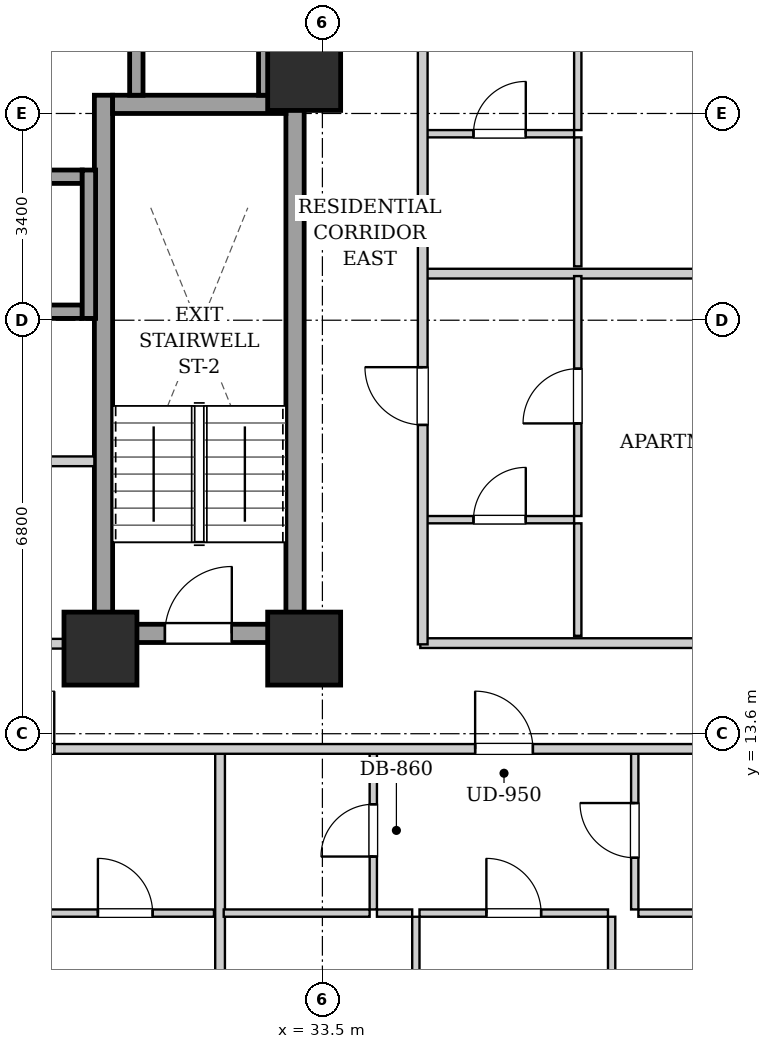
"""IFC4 building model, lengths in metres.
Left out: names, types, materials, properties, quantities, classifications, styles, units other than length and angle.
Written with IfcOpenShell. Run it as: python <this file> out.ifc"""

import sys

from ifc_helpers import new_model, si_unit, direction, frame, frame_2d, origin, origin_2d, place, context, subcontext, project, spatial, rectangle, extrude, element, fill, save


model = new_model("IFC4")
c1 = context("Model", 3, precision=1e-05, world=origin(), true_north=direction((0.0, 1.0)))
c2 = subcontext(c1, "Body", "Model", "MODEL_VIEW")
j1 = project(units=[si_unit("LENGTHUNIT", "METRE"), si_unit("PLANEANGLEUNIT", "RADIAN")], contexts=[c1])
p1 = place(None, origin())
s1 = spatial("IfcSite", under=j1, at=p1, CompositionType="ELEMENT")
p2 = place(p1, origin())
s2 = spatial("IfcBuilding", under=s1, at=p2, CompositionType="ELEMENT")
p3 = place(p2, frame((0.0, 0.0, 54.6)))
s3 = spatial("IfcBuildingStorey", under=s2, at=p3, CompositionType="ELEMENT", Elevation=54.6)
for number, where, z_axis, x_axis in (
    (1, (29.85, 15.0, 0.0), (0.0, 0.0, 1.0), (1.0, 0.0, 0.0)),
    (2, (33.2, 15.0, 0.0), (0.0, 0.0, 1.0), (1.0, 0.0, 0.0)),
    (3, (33.2, 24.45, 0.0), (0.0, 0.0, 1.0), (1.0, 0.0, 0.0)),
):
    element("IfcColumn", number, at=place(p3, frame(where, z_axis=z_axis, x_axis=x_axis)), inside=s3, PredefinedType="COLUMN", context=c2, shape_type="SweptSolid", body=[
        extrude(rectangle(XDim=1.2, YDim=1.2, at=origin_2d()), origin(), (0.0, 0.0, 1.0), 3.2),
    ])
for number, where, z_axis, x_axis in (
    (4, (29.9, 15.1, 0.0), (0.0, 0.0, 1.0), (0.0, 1.0, 0.0)),
    (5, (33.05, 15.1, 0.0), (0.0, 0.0, 1.0), (0.0, 1.0, 0.0)),
):
    element("IfcWall", number, at=place(p3, frame(where, z_axis=z_axis, x_axis=x_axis)), inside=s3, PredefinedType="SHEAR", context=c2, shape_type="SweptSolid", body=[
        extrude(rectangle(XDim=9.0, YDim=0.3, at=frame_2d((4.5, 0.0))), origin(), (0.0, 0.0, 1.0), 2.94),
    ])
p4 = place(p3, frame((30.05, 23.95, 0.0), z_axis=(0.0, 0.0, 1.0), x_axis=(1.0, 0.0, 0.0)))
e6 = element("IfcWall", 6, at=p4, inside=s3, PredefinedType="SHEAR", context=c2, shape_type="SweptSolid", body=[
    extrude(rectangle(XDim=2.85, YDim=0.3, at=frame_2d((1.425, 0.0))), origin(), (0.0, 0.0, 1.0), 2.94),
])
p5 = place(p3, frame((30.05, 15.25, 0.0), z_axis=(0.0, 0.0, 1.0), x_axis=(1.0, 0.0, 0.0)))
e7 = element("IfcWall", 7, at=p5, inside=s3, PredefinedType="SHEAR", context=c2, shape_type="SweptSolid", body=[
    extrude(rectangle(XDim=2.85, YDim=0.3, at=frame_2d((1.425, 0.0))), origin(), (0.0, 0.0, 1.0), 2.94),
])
p6 = place(p5, frame((0.86, 0.0, 0.0)))
e8 = element("IfcOpeningElement", 8, at=p6, cuts=e7, PredefinedType="OPENING", context=c2, shape_type="SweptSolid", body=[
    extrude(rectangle(XDim=1.1, YDim=2.05, at=frame_2d((0.55, 1.025))), frame((0.0, 0.16, 0.0), z_axis=(0.0, -1.0, 0.0), x_axis=(1.0, 0.0, 0.0)), (0.0, 0.0, 1.0), 0.32),
])
for number, where, z_axis, x_axis in (
    (9, (27.65, 20.54, 0.0), (0.0, 0.0, 1.0), (1.0, 0.0, 0.0)),
    (10, (27.65, 22.76, 0.0), (0.0, 0.0, 1.0), (1.0, 0.0, 0.0)),
):
    element("IfcWall", number, at=place(p3, frame(where, z_axis=z_axis, x_axis=x_axis)), inside=s3, PredefinedType="SHEAR", context=c2, shape_type="SweptSolid", body=[
        extrude(rectangle(XDim=1.9, YDim=0.22, at=frame_2d((0.95, 0.0))), origin(), (0.0, 0.0, 1.0), 2.94),
    ])
p7 = place(p3, frame((29.66, 20.43, 0.0), z_axis=(0.0, 0.0, 1.0), x_axis=(0.0, 1.0, 0.0)))
e11 = element("IfcWall", 11, at=p7, inside=s3, PredefinedType="SHEAR", context=c2, shape_type="SweptSolid", body=[
    extrude(rectangle(XDim=2.44, YDim=0.22, at=frame_2d((1.22, 0.0))), origin(), (0.0, 0.0, 1.0), 2.94),
])
for number, where, z_axis, x_axis in (
    (12, (30.44, 24.1, 0.0), (0.0, 0.0, 1.0), (0.0, 1.0, 0.0)),
    (13, (32.56, 24.1, 0.0), (0.0, 0.0, 1.0), (0.0, 1.0, 0.0)),
):
    element("IfcWall", number, at=place(p3, frame(where, z_axis=z_axis, x_axis=x_axis)), inside=s3, PredefinedType="SHEAR", context=c2, shape_type="SweptSolid", body=[
        extrude(rectangle(XDim=2.07, YDim=0.22, at=frame_2d((1.035, 0.0))), origin(), (0.0, 0.0, 1.0), 2.94),
    ])
p8 = place(p3, frame((21.25, 15.08, 0.0), z_axis=(0.0, 0.0, 1.0), x_axis=(1.0, 0.0, 0.0)))
e14 = element("IfcWall", 14, at=p8, inside=s3, PredefinedType="PARTITIONING", context=c2, shape_type="SweptSolid", body=[
    extrude(rectangle(XDim=8.5, YDim=0.16, at=frame_2d((4.25, 0.0))), origin(), (0.0, 0.0, 1.0), 2.232),
])
p9 = place(p8, frame((3.725, 0.0, 0.0)))
e15 = element("IfcOpeningElement", 15, at=p9, cuts=e14, PredefinedType="OPENING", context=c2, shape_type="SweptSolid", body=[
    extrude(rectangle(XDim=1.05, YDim=2.05, at=frame_2d((0.525, 1.025))), frame((0.0, 0.09, 0.0), z_axis=(0.0, -1.0, 0.0), x_axis=(1.0, 0.0, 0.0)), (0.0, 0.0, 1.0), 0.18),
])
p10 = place(p3, frame((28.65, 18.08, 0.0), z_axis=(0.0, 0.0, 1.0), x_axis=(1.0, 0.0, 0.0)))
e16 = element("IfcWall", 16, at=p10, inside=s3, PredefinedType="PARTITIONING", context=c2, shape_type="SweptSolid", body=[
    extrude(rectangle(XDim=1.1, YDim=0.16, at=frame_2d((0.55, 0.0))), origin(), (0.0, 0.0, 1.0), 2.94),
])
p11 = place(p3, frame((33.12, 24.12, 0.0), z_axis=(0.0, 0.0, 1.0), x_axis=(0.0, 1.0, 0.0)))
e17 = element("IfcWall", 17, at=p11, inside=s3, PredefinedType="PARTITIONING", context=c2, shape_type="SweptSolid", body=[
    extrude(rectangle(XDim=4.76, YDim=0.16, at=frame_2d((2.38, 0.0))), origin(), (0.0, 0.0, 1.0), 2.94),
])
p12 = place(p3, frame((35.11, 15.09, 0.0), z_axis=(0.0, 0.0, 1.0), x_axis=(1.0, 0.0, 0.0)))
e18 = element("IfcWall", 18, at=p12, inside=s3, PredefinedType="PARTITIONING", context=c2, shape_type="SweptSolid", body=[
    extrude(rectangle(XDim=11.11, YDim=0.16, at=frame_2d((5.555, 0.0))), origin(), (0.0, 0.0, 1.0), 2.232),
])
p13 = place(p3, frame((28.799, 10.65, 0.0), z_axis=(0.0, 0.0, 1.0), x_axis=(1.0, 0.0, 0.0)))
e19 = element("IfcWall", 19, at=p13, inside=s3, PredefinedType="PARTITIONING", context=c2, shape_type="SweptSolid", body=[
    extrude(rectangle(XDim=2.918, YDim=0.12, at=frame_2d((1.459, 0.0))), origin(), (0.0, 0.0, 1.0), 2.94),
])
p14 = place(p13, frame((1.009, 0.0, 0.0)))
e20 = element("IfcOpeningElement", 20, at=p14, cuts=e19, PredefinedType="OPENING", context=c2, shape_type="SweptSolid", body=[
    extrude(rectangle(XDim=0.9, YDim=2.05, at=frame_2d((0.45, 1.025))), frame((0.0, 0.07, 0.0), z_axis=(0.0, -1.0, 0.0), x_axis=(1.0, 0.0, 0.0)), (0.0, 0.0, 1.0), 0.14),
])
p15 = place(p3, frame((31.817, 0.28, 0.0), z_axis=(0.0, 0.0, 1.0), x_axis=(0.0, 1.0, 0.0)))
e21 = element("IfcWall", 21, at=p15, inside=s3, PredefinedType="PARTITIONING", context=c2, shape_type="SweptSolid", body=[
    extrude(rectangle(XDim=13.03, YDim=0.16, at=frame_2d((6.515, 0.0))), origin(), (0.0, 0.0, 1.0), 2.94),
])
p16 = place(p3, frame((34.337, 10.71, 0.0), z_axis=(0.0, 0.0, 1.0), x_axis=(0.0, 1.0, 0.0)))
e22 = element("IfcWall", 22, at=p16, inside=s3, PredefinedType="PARTITIONING", context=c2, shape_type="SweptSolid", body=[
    extrude(rectangle(XDim=2.6, YDim=0.12, at=frame_2d((1.3, 0.0))), origin(), (0.0, 0.0, 1.0), 2.94),
])
p17 = place(p16, frame((0.87, 0.0, 0.0)))
e23 = element("IfcOpeningElement", 23, at=p17, cuts=e22, PredefinedType="OPENING", context=c2, shape_type="SweptSolid", body=[
    extrude(rectangle(XDim=0.86, YDim=2.05, at=frame_2d((0.43, 1.025))), frame((0.0, 0.07, 0.0), z_axis=(0.0, -1.0, 0.0), x_axis=(1.0, 0.0, 0.0)), (0.0, 0.0, 1.0), 0.14),
])
p18 = place(p3, frame((31.877, 10.65, 0.0), z_axis=(0.0, 0.0, 1.0), x_axis=(1.0, 0.0, 0.0)))
e24 = element("IfcWall", 24, at=p18, inside=s3, PredefinedType="PARTITIONING", context=c2, shape_type="SweptSolid", body=[
    extrude(rectangle(XDim=2.4, YDim=0.12, at=frame_2d((1.2, 0.0))), origin(), (0.0, 0.0, 1.0), 2.94),
])
p19 = place(p3, frame((38.637, 10.71, 0.0), z_axis=(0.0, 0.0, 1.0), x_axis=(0.0, 1.0, 0.0)))
e25 = element("IfcWall", 25, at=p19, inside=s3, PredefinedType="PARTITIONING", context=c2, shape_type="SweptSolid", body=[
    extrude(rectangle(XDim=2.6, YDim=0.12, at=frame_2d((1.3, 0.0))), origin(), (0.0, 0.0, 1.0), 2.94),
])
p20 = place(p19, frame((0.85, 0.0, 0.0)))
e26 = element("IfcOpeningElement", 26, at=p20, cuts=e25, PredefinedType="OPENING", context=c2, shape_type="SweptSolid", body=[
    extrude(rectangle(XDim=0.9, YDim=2.05, at=frame_2d((0.45, 1.025))), frame((0.0, 0.07, 0.0), z_axis=(0.0, -1.0, 0.0), x_axis=(1.0, 0.0, 0.0)), (0.0, 0.0, 1.0), 0.14),
])
p21 = place(p3, frame((34.397, 10.65, 0.0), z_axis=(0.0, 0.0, 1.0), x_axis=(1.0, 0.0, 0.0)))
e27 = element("IfcWall", 27, at=p21, inside=s3, PredefinedType="PARTITIONING", context=c2, shape_type="SweptSolid", body=[
    extrude(rectangle(XDim=0.58, YDim=0.12, at=frame_2d((0.29, 0.0))), origin(), (0.0, 0.0, 1.0), 2.94),
])
p22 = place(p3, frame((35.097, 10.65, 0.0), z_axis=(0.0, 0.0, 1.0), x_axis=(1.0, 0.0, 0.0)))
e28 = element("IfcWall", 28, at=p22, inside=s3, PredefinedType="PARTITIONING", context=c2, shape_type="SweptSolid", body=[
    extrude(rectangle(XDim=3.1, YDim=0.12, at=frame_2d((1.55, 0.0))), origin(), (0.0, 0.0, 1.0), 2.94),
])
p23 = place(p22, frame((1.1, 0.0, 0.0)))
e29 = element("IfcOpeningElement", 29, at=p23, cuts=e28, PredefinedType="OPENING", context=c2, shape_type="SweptSolid", body=[
    extrude(rectangle(XDim=0.9, YDim=2.05, at=frame_2d((0.45, 1.025))), frame((0.0, 0.07, 0.0), z_axis=(0.0, -1.0, 0.0), x_axis=(1.0, 0.0, 0.0)), (0.0, 0.0, 1.0), 0.14),
])
p24 = place(p3, frame((38.697, 10.65, 0.0), z_axis=(0.0, 0.0, 1.0), x_axis=(1.0, 0.0, 0.0)))
e30 = element("IfcWall", 30, at=p24, inside=s3, PredefinedType="PARTITIONING", context=c2, shape_type="SweptSolid", body=[
    extrude(rectangle(XDim=3.25, YDim=0.12, at=frame_2d((1.625, 0.0))), origin(), (0.0, 0.0, 1.0), 2.94),
])
p25 = place(p24, frame((1.175, 0.0, 0.0)))
e31 = element("IfcOpeningElement", 31, at=p25, cuts=e30, PredefinedType="OPENING", context=c2, shape_type="SweptSolid", body=[
    extrude(rectangle(XDim=0.9, YDim=2.05, at=frame_2d((0.45, 1.025))), frame((0.0, 0.07, 0.0), z_axis=(0.0, -1.0, 0.0), x_axis=(1.0, 0.0, 0.0)), (0.0, 0.0, 1.0), 0.14),
])
p26 = place(p3, frame((35.037, 0.28, 0.0), z_axis=(0.0, 0.0, 1.0), x_axis=(0.0, 1.0, 0.0)))
e32 = element("IfcWall", 32, at=p26, inside=s3, PredefinedType="PARTITIONING", context=c2, shape_type="SweptSolid", body=[
    extrude(rectangle(XDim=10.31, YDim=0.12, at=frame_2d((5.155, 0.0))), origin(), (0.0, 0.0, 1.0), 2.94),
])
p27 = place(p26, frame((4.69, 0.0, 0.0)))
e33 = element("IfcOpeningElement", 33, at=p27, cuts=e32, PredefinedType="OPENING", context=c2, shape_type="SweptSolid", body=[
    extrude(rectangle(XDim=0.9, YDim=2.05, at=frame_2d((0.45, 1.025))), frame((0.0, 0.07, 0.0), z_axis=(0.0, -1.0, 0.0), x_axis=(1.0, 0.0, 0.0)), (0.0, 0.0, 1.0), 0.14),
])
p28 = place(p3, frame((38.257, 0.28, 0.0), z_axis=(0.0, 0.0, 1.0), x_axis=(0.0, 1.0, 0.0)))
e34 = element("IfcWall", 34, at=p28, inside=s3, PredefinedType="PARTITIONING", context=c2, shape_type="SweptSolid", body=[
    extrude(rectangle(XDim=10.31, YDim=0.12, at=frame_2d((5.155, 0.0))), origin(), (0.0, 0.0, 1.0), 2.94),
])
p29 = place(p28, frame((4.69, 0.0, 0.0)))
e35 = element("IfcOpeningElement", 35, at=p29, cuts=e34, PredefinedType="OPENING", context=c2, shape_type="SweptSolid", body=[
    extrude(rectangle(XDim=0.9, YDim=2.05, at=frame_2d((0.45, 1.025))), frame((0.0, 0.07, 0.0), z_axis=(0.0, -1.0, 0.0), x_axis=(1.0, 0.0, 0.0)), (0.0, 0.0, 1.0), 0.14),
])
p30 = place(p3, frame((35.19, 21.166, 0.0), z_axis=(0.0, 0.0, 1.0), x_axis=(1.0, 0.0, 0.0)))
e36 = element("IfcWall", 36, at=p30, inside=s3, PredefinedType="PARTITIONING", context=c2, shape_type="SweptSolid", body=[
    extrude(rectangle(XDim=11.03, YDim=0.16, at=frame_2d((5.515, 0.0))), origin(), (0.0, 0.0, 1.0), 2.94),
])
p31 = place(p3, frame((35.19, 17.12, 0.0), z_axis=(0.0, 0.0, 1.0), x_axis=(1.0, 0.0, 0.0)))
e37 = element("IfcWall", 37, at=p31, inside=s3, PredefinedType="PARTITIONING", context=c2, shape_type="SweptSolid", body=[
    extrude(rectangle(XDim=2.45, YDim=0.12, at=frame_2d((1.225, 0.0))), origin(), (0.0, 0.0, 1.0), 2.94),
])
p32 = place(p31, frame((0.795, 0.0, 0.0)))
e38 = element("IfcOpeningElement", 38, at=p32, cuts=e37, PredefinedType="OPENING", context=c2, shape_type="SweptSolid", body=[
    extrude(rectangle(XDim=0.86, YDim=2.05, at=frame_2d((0.43, 1.025))), frame((0.0, 0.07, 0.0), z_axis=(0.0, -1.0, 0.0), x_axis=(1.0, 0.0, 0.0)), (0.0, 0.0, 1.0), 0.14),
])
p33 = place(p3, frame((37.7, 15.21, 0.0), z_axis=(0.0, 0.0, 1.0), x_axis=(0.0, 1.0, 0.0)))
e39 = element("IfcWall", 39, at=p33, inside=s3, PredefinedType="PARTITIONING", context=c2, shape_type="SweptSolid", body=[
    extrude(rectangle(XDim=1.85, YDim=0.12, at=frame_2d((0.925, 0.0))), origin(), (0.0, 0.0, 1.0), 2.94),
])
p34 = place(p3, frame((37.7, 17.18, 0.0), z_axis=(0.0, 0.0, 1.0), x_axis=(0.0, 1.0, 0.0)))
e40 = element("IfcWall", 40, at=p34, inside=s3, PredefinedType="PARTITIONING", context=c2, shape_type="SweptSolid", body=[
    extrude(rectangle(XDim=3.946, YDim=0.12, at=frame_2d((1.973, 0.0))), origin(), (0.0, 0.0, 1.0), 2.94),
])
p35 = place(p34, frame((1.523, 0.0, 0.0)))
e41 = element("IfcOpeningElement", 41, at=p35, cuts=e40, PredefinedType="OPENING", context=c2, shape_type="SweptSolid", body=[
    extrude(rectangle(XDim=0.9, YDim=2.05, at=frame_2d((0.45, 1.025))), frame((0.0, 0.07, 0.0), z_axis=(0.0, -1.0, 0.0), x_axis=(1.0, 0.0, 0.0)), (0.0, 0.0, 1.0), 0.14),
])
p36 = place(p3, frame((35.19, 23.467, 0.0), z_axis=(0.0, 0.0, 1.0), x_axis=(1.0, 0.0, 0.0)))
e42 = element("IfcWall", 42, at=p36, inside=s3, PredefinedType="PARTITIONING", context=c2, shape_type="SweptSolid", body=[
    extrude(rectangle(XDim=2.45, YDim=0.12, at=frame_2d((1.225, 0.0))), origin(), (0.0, 0.0, 1.0), 2.94),
])
p37 = place(p36, frame((0.795, 0.0, 0.0)))
e43 = element("IfcOpeningElement", 43, at=p37, cuts=e42, PredefinedType="OPENING", context=c2, shape_type="SweptSolid", body=[
    extrude(rectangle(XDim=0.86, YDim=2.05, at=frame_2d((0.43, 1.025))), frame((0.0, 0.07, 0.0), z_axis=(0.0, -1.0, 0.0), x_axis=(1.0, 0.0, 0.0)), (0.0, 0.0, 1.0), 0.14),
])
p38 = place(p3, frame((37.7, 21.286, 0.0), z_axis=(0.0, 0.0, 1.0), x_axis=(0.0, 1.0, 0.0)))
e44 = element("IfcWall", 44, at=p38, inside=s3, PredefinedType="PARTITIONING", context=c2, shape_type="SweptSolid", body=[
    extrude(rectangle(XDim=2.121, YDim=0.12, at=frame_2d((1.061, 0.0))), origin(), (0.0, 0.0, 1.0), 2.94),
])
p39 = place(p3, frame((37.7, 23.527, 0.0), z_axis=(0.0, 0.0, 1.0), x_axis=(0.0, 1.0, 0.0)))
e45 = element("IfcWall", 45, at=p39, inside=s3, PredefinedType="PARTITIONING", context=c2, shape_type="SweptSolid", body=[
    extrude(rectangle(XDim=5.333, YDim=0.12, at=frame_2d((2.667, 0.0))), origin(), (0.0, 0.0, 1.0), 2.94),
])
p40 = place(p39, frame((2.216, 0.0, 0.0)))
e46 = element("IfcOpeningElement", 46, at=p40, cuts=e45, PredefinedType="OPENING", context=c2, shape_type="SweptSolid", body=[
    extrude(rectangle(XDim=0.9, YDim=2.05, at=frame_2d((0.45, 1.025))), frame((0.0, 0.07, 0.0), z_axis=(0.0, -1.0, 0.0), x_axis=(1.0, 0.0, 0.0)), (0.0, 0.0, 1.0), 0.14),
])
p41 = place(p3, frame((10.05, 13.35, 0.0), z_axis=(0.0, 0.0, 1.0), x_axis=(1.0, 0.0, 0.0)))
e47 = element("IfcWall", 47, at=p41, inside=s3, PredefinedType="PARTITIONING", context=c2, shape_type="SweptSolid", body=[
    extrude(rectangle(XDim=33.9, YDim=0.16, at=frame_2d((16.95, 0.0))), origin(), (0.0, 0.0, 1.0), 2.94),
])
p42 = place(p41, frame((0.813, 0.0, 0.0)))
e48 = element("IfcOpeningElement", 48, at=p42, cuts=e47, PredefinedType="OPENING", context=c2, shape_type="SweptSolid", body=[
    extrude(rectangle(XDim=0.95, YDim=2.1, at=frame_2d((0.475, 1.05))), frame((0.0, 0.09, 0.0), z_axis=(0.0, -1.0, 0.0), x_axis=(1.0, 0.0, 0.0)), (0.0, 0.0, 1.0), 0.18),
])
p43 = place(p41, frame((6.04, 0.0, 0.0)))
e49 = element("IfcOpeningElement", 49, at=p43, cuts=e47, PredefinedType="OPENING", context=c2, shape_type="SweptSolid", body=[
    extrude(rectangle(XDim=0.95, YDim=2.1, at=frame_2d((0.475, 1.05))), frame((0.0, 0.09, 0.0), z_axis=(0.0, -1.0, 0.0), x_axis=(1.0, 0.0, 0.0)), (0.0, 0.0, 1.0), 0.18),
])
p44 = place(p41, frame((18.09, 0.0, 0.0)))
e50 = element("IfcOpeningElement", 50, at=p44, cuts=e47, PredefinedType="OPENING", context=c2, shape_type="SweptSolid", body=[
    extrude(rectangle(XDim=0.95, YDim=2.1, at=frame_2d((0.475, 1.05))), frame((0.0, 0.09, 0.0), z_axis=(0.0, -1.0, 0.0), x_axis=(1.0, 0.0, 0.0)), (0.0, 0.0, 1.0), 0.18),
])
p45 = place(p41, frame((25.962, 0.0, 0.0)))
e51 = element("IfcOpeningElement", 51, at=p45, cuts=e47, PredefinedType="OPENING", context=c2, shape_type="SweptSolid", body=[
    extrude(rectangle(XDim=0.95, YDim=2.1, at=frame_2d((0.475, 1.05))), frame((0.0, 0.09, 0.0), z_axis=(0.0, -1.0, 0.0), x_axis=(1.0, 0.0, 0.0)), (0.0, 0.0, 1.0), 0.18),
])
p46 = place(p3, frame((35.15, 15.07, 0.0), z_axis=(0.0, 0.0, 1.0), x_axis=(0.0, 1.0, 0.0)))
e52 = element("IfcWall", 52, at=p46, inside=s3, PredefinedType="PARTITIONING", context=c2, shape_type="SweptSolid", body=[
    extrude(rectangle(XDim=13.93, YDim=0.16, at=frame_2d((6.965, 0.0))), origin(), (0.0, 0.0, 1.0), 2.94),
])
p47 = place(p46, frame((3.608, 0.0, 0.0)))
e53 = element("IfcOpeningElement", 53, at=p47, cuts=e52, PredefinedType="OPENING", context=c2, shape_type="SweptSolid", body=[
    extrude(rectangle(XDim=0.95, YDim=2.1, at=frame_2d((0.475, 1.05))), frame((0.0, 0.09, 0.0), z_axis=(0.0, -1.0, 0.0), x_axis=(1.0, 0.0, 0.0)), (0.0, 0.0, 1.0), 0.18),
])
p48 = place(p46, frame((10.649, 0.0, 0.0)))
e54 = element("IfcOpeningElement", 54, at=p48, cuts=e52, PredefinedType="OPENING", context=c2, shape_type="SweptSolid", body=[
    extrude(rectangle(XDim=0.95, YDim=2.1, at=frame_2d((0.475, 1.05))), frame((0.0, 0.09, 0.0), z_axis=(0.0, -1.0, 0.0), x_axis=(1.0, 0.0, 0.0)), (0.0, 0.0, 1.0), 0.18),
])
p49 = place(p6, origin())
e55 = element("IfcDoor", 55, at=p49, inside=s3, OperationType="SINGLE_SWING_RIGHT", PredefinedType="DOOR", context=c2, shape_type="SweptSolid", body=[
    extrude(rectangle(XDim=1.1, YDim=2.05, at=frame_2d((0.55, 1.025))), frame((0.0, 0.025, 0.0), z_axis=(0.0, -1.0, 0.0), x_axis=(1.0, 0.0, 0.0)), (0.0, 0.0, 1.0), 0.05),
])
fill(e8, e55)
p50 = place(p14, origin())
e56 = element("IfcDoor", 56, at=p50, inside=s3, OperationType="SINGLE_SWING_LEFT", PredefinedType="DOOR", context=c2, shape_type="SweptSolid", body=[
    extrude(rectangle(XDim=0.9, YDim=2.05, at=frame_2d((0.45, 1.025))), frame((0.0, 0.025, 0.0), z_axis=(0.0, -1.0, 0.0), x_axis=(1.0, 0.0, 0.0)), (0.0, 0.0, 1.0), 0.05),
])
fill(e20, e56)
p51 = place(p17, origin())
e57 = element("IfcDoor", 57, at=p51, inside=s3, OperationType="SINGLE_SWING_LEFT", PredefinedType="DOOR", context=c2, shape_type="SweptSolid", body=[
    extrude(rectangle(XDim=0.86, YDim=2.05, at=frame_2d((0.43, 1.025))), frame((0.0, 0.025, 0.0), z_axis=(0.0, -1.0, 0.0), x_axis=(1.0, 0.0, 0.0)), (0.0, 0.0, 1.0), 0.05),
])
fill(e23, e57)
p52 = place(p20, origin())
e58 = element("IfcDoor", 58, at=p52, inside=s3, OperationType="SINGLE_SWING_RIGHT", PredefinedType="DOOR", context=c2, shape_type="SweptSolid", body=[
    extrude(rectangle(XDim=0.9, YDim=2.05, at=frame_2d((0.45, 1.025))), frame((0.0, 0.025, 0.0), z_axis=(0.0, -1.0, 0.0), x_axis=(1.0, 0.0, 0.0)), (0.0, 0.0, 1.0), 0.05),
])
fill(e26, e58)
p53 = place(p23, origin())
e59 = element("IfcDoor", 59, at=p53, inside=s3, OperationType="SINGLE_SWING_LEFT", PredefinedType="DOOR", context=c2, shape_type="SweptSolid", body=[
    extrude(rectangle(XDim=0.9, YDim=2.05, at=frame_2d((0.45, 1.025))), frame((0.0, 0.025, 0.0), z_axis=(0.0, -1.0, 0.0), x_axis=(1.0, 0.0, 0.0)), (0.0, 0.0, 1.0), 0.05),
])
fill(e29, e59)
p54 = place(p32, origin())
e60 = element("IfcDoor", 60, at=p54, inside=s3, OperationType="SINGLE_SWING_RIGHT", PredefinedType="DOOR", context=c2, shape_type="SweptSolid", body=[
    extrude(rectangle(XDim=0.86, YDim=2.05, at=frame_2d((0.43, 1.025))), frame((0.0, 0.025, 0.0), z_axis=(0.0, -1.0, 0.0), x_axis=(1.0, 0.0, 0.0)), (0.0, 0.0, 1.0), 0.05),
])
fill(e38, e60)
p55 = place(p35, origin())
e61 = element("IfcDoor", 61, at=p55, inside=s3, OperationType="SINGLE_SWING_LEFT", PredefinedType="DOOR", context=c2, shape_type="SweptSolid", body=[
    extrude(rectangle(XDim=0.9, YDim=2.05, at=frame_2d((0.45, 1.025))), frame((0.0, 0.025, 0.0), z_axis=(0.0, -1.0, 0.0), x_axis=(1.0, 0.0, 0.0)), (0.0, 0.0, 1.0), 0.05),
])
fill(e41, e61)
p56 = place(p37, origin())
e62 = element("IfcDoor", 62, at=p56, inside=s3, OperationType="SINGLE_SWING_RIGHT", PredefinedType="DOOR", context=c2, shape_type="SweptSolid", body=[
    extrude(rectangle(XDim=0.86, YDim=2.05, at=frame_2d((0.43, 1.025))), frame((0.0, 0.025, 0.0), z_axis=(0.0, -1.0, 0.0), x_axis=(1.0, 0.0, 0.0)), (0.0, 0.0, 1.0), 0.05),
])
fill(e43, e62)
p57 = place(p44, origin())
e63 = element("IfcDoor", 63, at=p57, inside=s3, OperationType="SINGLE_SWING_RIGHT", PredefinedType="DOOR", context=c2, shape_type="SweptSolid", body=[
    extrude(rectangle(XDim=0.95, YDim=2.1, at=frame_2d((0.475, 1.05))), frame((0.0, 0.025, 0.0), z_axis=(0.0, -1.0, 0.0), x_axis=(1.0, 0.0, 0.0)), (0.0, 0.0, 1.0), 0.05),
])
fill(e50, e63)
p58 = place(p45, origin())
e64 = element("IfcDoor", 64, at=p58, inside=s3, OperationType="SINGLE_SWING_LEFT", PredefinedType="DOOR", context=c2, shape_type="SweptSolid", body=[
    extrude(rectangle(XDim=0.95, YDim=2.1, at=frame_2d((0.475, 1.05))), frame((0.0, 0.025, 0.0), z_axis=(0.0, -1.0, 0.0), x_axis=(1.0, 0.0, 0.0)), (0.0, 0.0, 1.0), 0.05),
])
fill(e51, e64)
p59 = place(p47, origin())
e65 = element("IfcDoor", 65, at=p59, inside=s3, OperationType="SINGLE_SWING_RIGHT", PredefinedType="DOOR", context=c2, shape_type="SweptSolid", body=[
    extrude(rectangle(XDim=0.95, YDim=2.1, at=frame_2d((0.475, 1.05))), frame((0.0, 0.025, 0.0), z_axis=(0.0, -1.0, 0.0), x_axis=(1.0, 0.0, 0.0)), (0.0, 0.0, 1.0), 0.05),
])
fill(e53, e65)
save(model, sys.argv[1])
